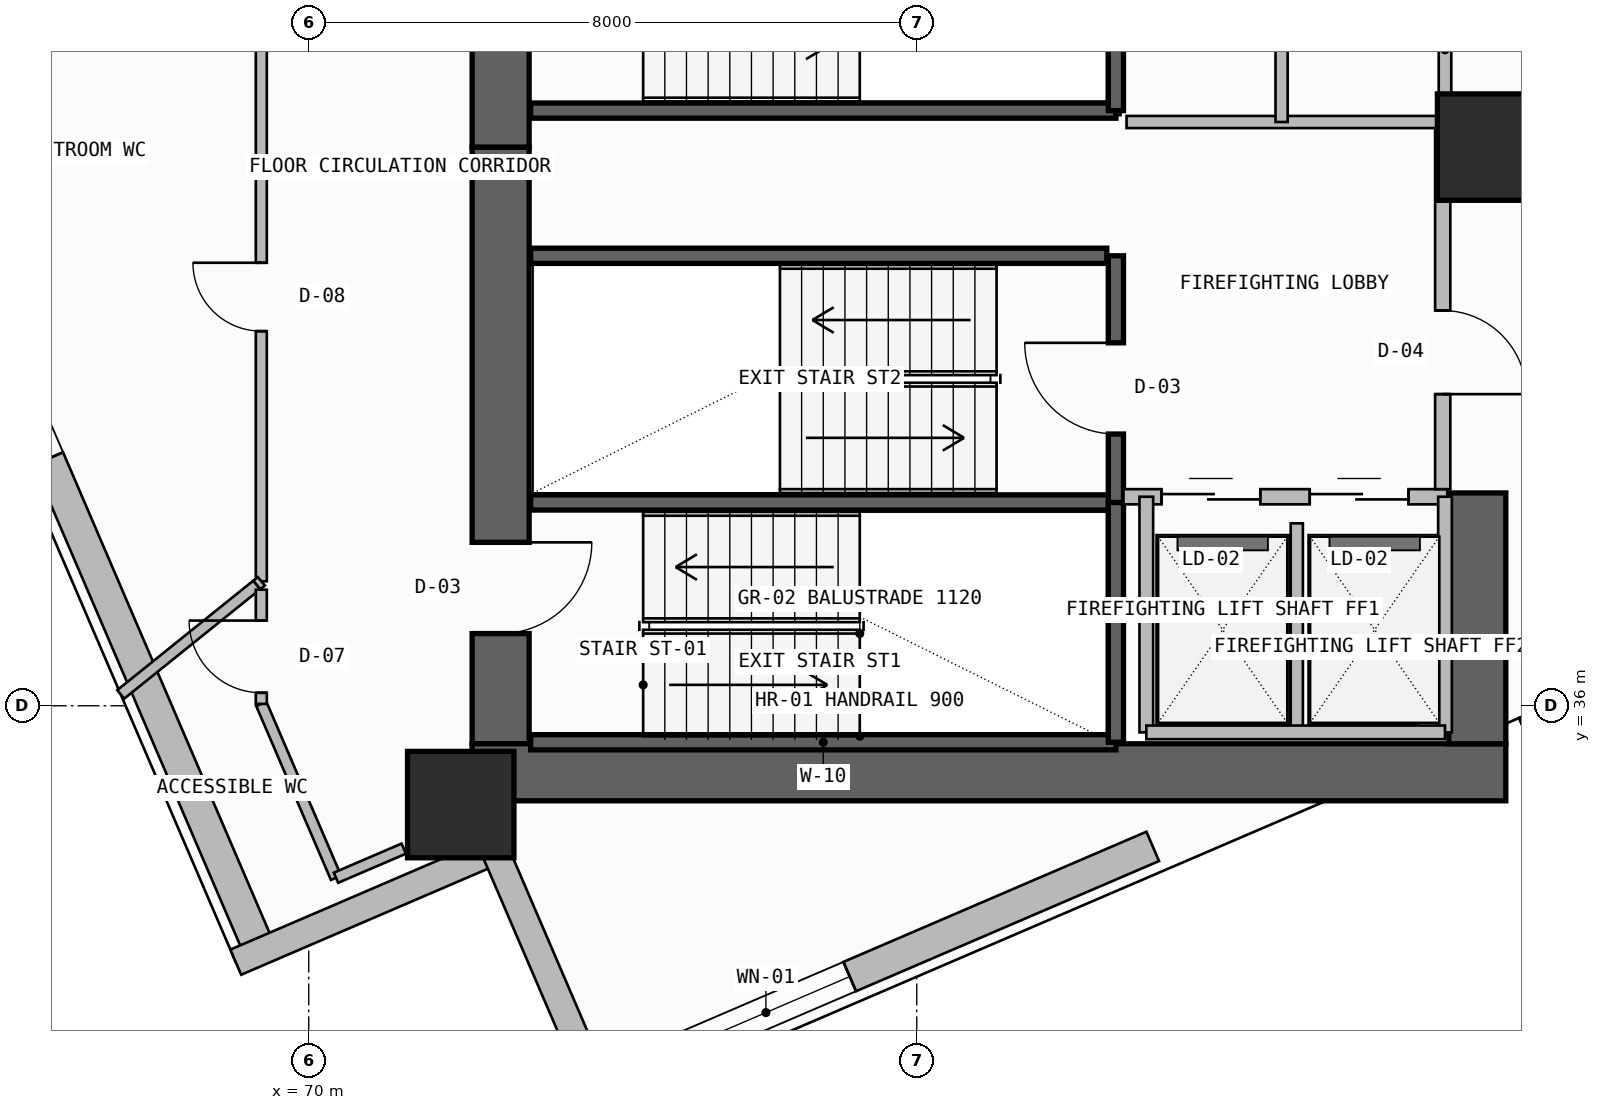
"""IFC4 building model, lengths in metres.
Left out: names, types, materials, properties, quantities, classifications, styles, units other than length and angle.
Written with IfcOpenShell. Run it as: python <this file> out.ifc"""

import sys

from ifc_helpers import new_model, si_unit, direction, frame, frame_2d, origin, origin_2d, place, context, subcontext, project, spatial, rectangle, extrude, element, fill, save


model = new_model("IFC4")
c1 = context("Model", 3, precision=1e-05, world=origin(), true_north=direction((0.0, 1.0)))
c2 = subcontext(c1, "Body", "Model", "MODEL_VIEW")
j1 = project(units=[si_unit("LENGTHUNIT", "METRE"), si_unit("PLANEANGLEUNIT", "RADIAN")], contexts=[c1])
p1 = place(None, origin())
s1 = spatial("IfcSite", under=j1, at=p1, CompositionType="ELEMENT")
p2 = place(p1, origin())
s2 = spatial("IfcBuilding", under=s1, at=p2, CompositionType="ELEMENT")
p3 = place(p2, frame((0.0, 0.0, 164.7)))
s3 = spatial("IfcBuildingStorey", under=s2, at=p3, CompositionType="ELEMENT", Elevation=164.7)
p4 = place(p3, frame((72.525, 35.5, -0.4), z_axis=(0.0, 0.0, 1.0), x_axis=(0.0, 1.0, 0.0)))
e1 = element("IfcWall", 1, at=p4, inside=s3, PredefinedType="SHEAR", context=c2, shape_type="SweptSolid", body=[
    extrude(rectangle(XDim=7.85, YDim=0.75, at=frame_2d((3.925, 0.0))), origin(), (0.0, 0.0, 1.0), 3.74),
])
p5 = place(p4, frame((1.45, 0.0, 0.4)))
e2 = element("IfcOpeningElement", 2, at=p5, cuts=e1, PredefinedType="OPENING", context=c2, shape_type="SweptSolid", body=[
    extrude(rectangle(XDim=1.2, YDim=2.2, at=frame_2d((0.6, 1.1))), frame((0.0, 0.385, 0.0), z_axis=(0.0, -1.0, 0.0), x_axis=(1.0, 0.0, 0.0)), (0.0, 0.0, 1.0), 0.77),
])
p6 = place(p3, frame((72.15, 35.125, -0.4), z_axis=(0.0, 0.0, 1.0), x_axis=(1.0, 0.0, 0.0)))
e3 = element("IfcWall", 3, at=p6, inside=s3, PredefinedType="SHEAR", context=c2, shape_type="SweptSolid", body=[
    extrude(rectangle(XDim=13.6, YDim=0.75, at=frame_2d((6.8, 0.0))), origin(), (0.0, 0.0, 1.0), 3.74),
])
p7 = place(p3, frame((85.375, 35.5, -0.4), z_axis=(0.0, 0.0, 1.0), x_axis=(0.0, 1.0, 0.0)))
e4 = element("IfcWall", 4, at=p7, inside=s3, PredefinedType="SHEAR", context=c2, shape_type="SweptSolid", body=[
    extrude(rectangle(XDim=3.3, YDim=0.75, at=frame_2d((1.65, 0.0))), origin(), (0.0, 0.0, 1.0), 3.74),
])
p8 = place(p3, frame((72.525, 43.35, -0.4), z_axis=(0.0, 0.0, 1.0), x_axis=(0.0, 1.0, 0.0)))
e5 = element("IfcWall", 5, at=p8, inside=s3, PredefinedType="SHEAR", context=c2, shape_type="SweptSolid", body=[
    extrude(rectangle(XDim=12.7, YDim=0.75, at=frame_2d((6.35, 0.0))), origin(), (0.0, 0.0, 1.0), 3.74),
])
p9 = place(p8, frame((1.35, 0.0, 0.4)))
e6 = element("IfcOpeningElement", 6, at=p9, cuts=e5, PredefinedType="OPENING", context=c2, shape_type="SweptSolid", body=[
    extrude(rectangle(XDim=1.2, YDim=2.2, at=frame_2d((0.6, 1.1))), frame((0.0, 0.385, 0.0), z_axis=(0.0, -1.0, 0.0), x_axis=(1.0, 0.0, 0.0)), (0.0, 0.0, 1.0), 0.77),
])
for number, where, z_axis, x_axis in (
    (7, (72.0, 34.7, 0.0), (0.0, 0.0, 1.0), (1.0, 0.0, 0.0)),
    (8, (85.55, 43.35, 0.0), (0.0, 0.0, 1.0), (1.0, 0.0, 0.0)),
):
    element("IfcColumn", number, at=place(p3, frame(where, z_axis=z_axis, x_axis=x_axis)), inside=s3, PredefinedType="COLUMN", context=c2, shape_type="SweptSolid", body=[
        extrude(rectangle(XDim=1.4, YDim=1.4, at=origin_2d()), origin(), (0.0, 0.0, 1.0), 3.6),
    ])
p10 = place(p3, frame((73.779, 31.003, 0.0), z_axis=(0.0, 0.0, 1.0), x_axis=(0.918797817688, 0.394728476565, 0.0)))
e9 = element("IfcWall", 9, at=p10, inside=s3, PredefinedType="SOLIDWALL", context=c2, shape_type="SweptSolid", body=[
    extrude(rectangle(XDim=7.973, YDim=0.42, at=frame_2d((3.987, 0.0))), origin(), (0.0, 0.0, 1.0), 3.34),
])
p11 = place(p10, frame((1.234, 0.0, 1.2)))
e10 = element("IfcOpeningElement", 10, at=p11, cuts=e9, PredefinedType="OPENING", context=c2, shape_type="SweptSolid", body=[
    extrude(rectangle(XDim=2.4, YDim=0.9, at=frame_2d((1.2, 0.45))), frame((0.0, 0.22, 0.0), z_axis=(0.0, -1.0, 0.0), x_axis=(1.0, 0.0, 0.0)), (0.0, 0.0, 1.0), 0.44),
])
p12 = place(p3, frame((64.367, 44.391, 0.0), z_axis=(0.0, 0.0, 1.0), x_axis=(0.394757430431, -0.918785378159, 0.0)))
e11 = element("IfcWall", 11, at=p12, inside=s3, PredefinedType="SOLIDWALL", context=c2, shape_type="SweptSolid", body=[
    extrude(rectangle(XDim=12.654, YDim=0.42, at=frame_2d((6.327, 0.0))), origin(), (0.0, 0.0, 1.0), 2.725),
])
p13 = place(p12, frame((3.193, 0.0, 1.2)))
e12 = element("IfcOpeningElement", 12, at=p13, cuts=e11, PredefinedType="OPENING", context=c2, shape_type="SweptSolid", body=[
    extrude(rectangle(XDim=2.4, YDim=0.9, at=frame_2d((1.2, 0.45))), frame((0.0, 0.22, 0.0), z_axis=(0.0, -1.0, 0.0), x_axis=(1.0, 0.0, 0.0)), (0.0, 0.0, 1.0), 0.44),
])
p14 = place(p3, frame((69.04, 32.627, 0.0), z_axis=(0.0, 0.0, 1.0), x_axis=(0.91879775808, 0.394728615312, 0.0)))
e13 = element("IfcWall", 13, at=p14, inside=s3, PredefinedType="SOLIDWALL", context=c2, shape_type="SweptSolid", body=[
    extrude(rectangle(XDim=3.713, YDim=0.36, at=frame_2d((1.856, 0.0))), origin(), (0.0, 0.0, 1.0), 3.34),
])
p15 = place(p3, frame((72.451, 34.092, 0.0), z_axis=(0.0, 0.0, 1.0), x_axis=(0.394752464447, -0.918787511786, 0.0)))
e14 = element("IfcWall", 14, at=p15, inside=s3, PredefinedType="SOLIDWALL", context=c2, shape_type="SweptSolid", body=[
    extrude(rectangle(XDim=3.713, YDim=0.36, at=frame_2d((1.856, 0.0))), origin(), (0.0, 0.0, 1.0), 3.34),
])
for number, where, z_axis, x_axis in (
    (15, (72.92, 35.52, -0.4), (0.0, 0.0, 1.0), (1.0, 0.0, 0.0)),
    (16, (72.92, 38.675, -0.4), (0.0, 0.0, 1.0), (1.0, 0.0, 0.0)),
):
    element("IfcWall", number, at=place(p3, frame(where, z_axis=z_axis, x_axis=x_axis)), inside=s3, PredefinedType="SOLIDWALL", context=c2, shape_type="SweptSolid", body=[
        extrude(rectangle(XDim=7.7, YDim=0.2, at=frame_2d((3.85, 0.0))), origin(), (0.0, 0.0, 1.0), 3.74),
    ])
p16 = place(p3, frame((80.62, 35.52, -0.4), z_axis=(0.0, 0.0, 1.0), x_axis=(0.0, 1.0, 0.0)))
e17 = element("IfcWall", 17, at=p16, inside=s3, PredefinedType="SOLIDWALL", context=c2, shape_type="SweptSolid", body=[
    extrude(rectangle(XDim=3.155, YDim=0.2, at=frame_2d((1.578, 0.0))), origin(), (0.0, 0.0, 1.0), 3.74),
])
p17 = place(p3, frame((80.62, 38.675, -0.4), z_axis=(0.0, 0.0, 1.0), x_axis=(0.0, 1.0, 0.0)))
e18 = element("IfcWall", 18, at=p17, inside=s3, PredefinedType="SOLIDWALL", context=c2, shape_type="SweptSolid", body=[
    extrude(rectangle(XDim=3.245, YDim=0.2, at=frame_2d((1.623, 0.0))), origin(), (0.0, 0.0, 1.0), 3.74),
])
p18 = place(p17, frame((0.9, 0.0, 0.4)))
e19 = element("IfcOpeningElement", 19, at=p18, cuts=e18, PredefinedType="OPENING", context=c2, shape_type="SweptSolid", body=[
    extrude(rectangle(XDim=1.2, YDim=2.2, at=frame_2d((0.6, 1.1))), frame((0.0, 0.11, 0.0), z_axis=(0.0, -1.0, 0.0), x_axis=(1.0, 0.0, 0.0)), (0.0, 0.0, 1.0), 0.22),
])
p19 = place(p3, frame((80.72, 38.75, 0.0), z_axis=(0.0, 0.0, 1.0), x_axis=(1.0, 0.0, 0.0)))
e20 = element("IfcWall", 20, at=p19, inside=s3, PredefinedType="SOLIDWALL", context=c2, shape_type="SweptSolid", body=[
    extrude(rectangle(XDim=4.26, YDim=0.2, at=frame_2d((2.13, 0.0))), origin(), (0.0, 0.0, 1.0), 3.34),
])
p20 = place(p19, frame((0.5, 0.0, 0.0)))
e21 = element("IfcOpeningElement", 21, at=p20, cuts=e20, PredefinedType="OPENING", context=c2, shape_type="SweptSolid", body=[
    extrude(rectangle(XDim=1.3, YDim=2.3, at=frame_2d((0.65, 1.15))), frame((0.0, 0.11, 0.0), z_axis=(0.0, -1.0, 0.0), x_axis=(1.0, 0.0, 0.0)), (0.0, 0.0, 1.0), 0.22),
])
p21 = place(p19, frame((2.45, 0.0, 0.0)))
e22 = element("IfcOpeningElement", 22, at=p21, cuts=e20, PredefinedType="OPENING", context=c2, shape_type="SweptSolid", body=[
    extrude(rectangle(XDim=1.3, YDim=2.3, at=frame_2d((0.65, 1.15))), frame((0.0, 0.11, 0.0), z_axis=(0.0, -1.0, 0.0), x_axis=(1.0, 0.0, 0.0)), (0.0, 0.0, 1.0), 0.22),
])
p22 = place(p3, frame((83.0, 35.65, 0.0), z_axis=(0.0, 0.0, 1.0), x_axis=(0.0, 1.0, 0.0)))
e23 = element("IfcWall", 23, at=p22, inside=s3, PredefinedType="PLUMBINGWALL", context=c2, shape_type="SweptSolid", body=[
    extrude(rectangle(XDim=2.75, YDim=0.16, at=frame_2d((1.375, 0.0))), origin(), (0.0, 0.0, 1.0), 3.34),
])
for number, where, z_axis, x_axis in (
    (24, (84.95, 35.65, 0.0), (0.0, 0.0, 1.0), (0.0, 1.0, 0.0)),
    (25, (81.02, 35.65, 0.0), (0.0, 0.0, 1.0), (0.0, 1.0, 0.0)),
):
    element("IfcWall", number, at=place(p3, frame(where, z_axis=z_axis, x_axis=x_axis)), inside=s3, PredefinedType="SOLIDWALL", context=c2, shape_type="SweptSolid", body=[
        extrude(rectangle(XDim=3.1, YDim=0.18, at=frame_2d((1.55, 0.0))), origin(), (0.0, 0.0, 1.0), 3.34),
    ])
p23 = place(p3, frame((81.02, 35.65, 0.0), z_axis=(0.0, 0.0, 1.0), x_axis=(1.0, 0.0, 0.0)))
e26 = element("IfcWall", 26, at=p23, inside=s3, PredefinedType="SOLIDWALL", context=c2, shape_type="SweptSolid", body=[
    extrude(rectangle(XDim=3.93, YDim=0.18, at=frame_2d((1.965, 0.0))), origin(), (0.0, 0.0, 1.0), 3.34),
])
p24 = place(p3, frame((84.92, 38.85, 0.0), z_axis=(0.0, 0.0, 1.0), x_axis=(0.0, 1.0, 0.0)))
e27 = element("IfcWall", 27, at=p24, inside=s3, PredefinedType="SOLIDWALL", context=c2, shape_type="SweptSolid", body=[
    extrude(rectangle(XDim=4.83, YDim=0.2, at=frame_2d((2.415, 0.0))), origin(), (0.0, 0.0, 1.0), 3.34),
])
p25 = place(p24, frame((1.25, 0.0, 0.0)))
e28 = element("IfcOpeningElement", 28, at=p25, cuts=e27, PredefinedType="OPENING", context=c2, shape_type="SweptSolid", body=[
    extrude(rectangle(XDim=1.1, YDim=2.2, at=frame_2d((0.55, 1.1))), frame((0.0, 0.11, 0.0), z_axis=(0.0, -1.0, 0.0), x_axis=(1.0, 0.0, 0.0)), (0.0, 0.0, 1.0), 0.22),
])
p26 = place(p3, frame((72.92, 41.92, -0.4), z_axis=(0.0, 0.0, 1.0), x_axis=(1.0, 0.0, 0.0)))
e29 = element("IfcWall", 29, at=p26, inside=s3, PredefinedType="SOLIDWALL", context=c2, shape_type="SweptSolid", body=[
    extrude(rectangle(XDim=7.58, YDim=0.2, at=frame_2d((3.79, 0.0))), origin(), (0.0, 0.0, 1.0), 3.74),
])
p27 = place(p3, frame((72.92, 43.83, -0.4), z_axis=(0.0, 0.0, 1.0), x_axis=(1.0, 0.0, 0.0)))
e30 = element("IfcWall", 30, at=p27, inside=s3, PredefinedType="SOLIDWALL", context=c2, shape_type="SweptSolid", body=[
    extrude(rectangle(XDim=7.7, YDim=0.2, at=frame_2d((3.85, 0.0))), origin(), (0.0, 0.0, 1.0), 3.74),
])
p28 = place(p3, frame((80.62, 43.83, -0.4), z_axis=(0.0, 0.0, 1.0), x_axis=(0.0, 1.0, 0.0)))
e31 = element("IfcWall", 31, at=p28, inside=s3, PredefinedType="SOLIDWALL", context=c2, shape_type="SweptSolid", body=[
    extrude(rectangle(XDim=3.24, YDim=0.2, at=frame_2d((1.62, 0.0))), origin(), (0.0, 0.0, 1.0), 3.74),
])
p29 = place(p3, frame((84.95, 43.68, 0.0), z_axis=(0.0, 0.0, 1.0), x_axis=(0.0, 1.0, 0.0)))
e32 = element("IfcWall", 32, at=p29, inside=s3, PredefinedType="PLUMBINGWALL", context=c2, shape_type="SweptSolid", body=[
    extrude(rectangle(XDim=1.9, YDim=0.165, at=frame_2d((0.95, 0.0))), origin(), (0.0, 0.0, 1.0), 3.34),
])
p30 = place(p3, frame((80.76, 43.68, 0.0), z_axis=(0.0, 0.0, 1.0), x_axis=(1.0, 0.0, 0.0)))
e33 = element("IfcWall", 33, at=p30, inside=s3, PredefinedType="PLUMBINGWALL", context=c2, shape_type="SweptSolid", body=[
    extrude(rectangle(XDim=4.19, YDim=0.16, at=frame_2d((2.095, 0.0))), origin(), (0.0, 0.0, 1.0), 3.34),
])
p31 = place(p3, frame((82.8, 43.68, 0.0), z_axis=(0.0, 0.0, 1.0), x_axis=(0.0, 1.0, 0.0)))
e34 = element("IfcWall", 34, at=p31, inside=s3, PredefinedType="PLUMBINGWALL", context=c2, shape_type="SweptSolid", body=[
    extrude(rectangle(XDim=1.9, YDim=0.16, at=frame_2d((0.95, 0.0))), origin(), (0.0, 0.0, 1.0), 3.34),
])
p32 = place(p3, frame((69.376, 45.119, 0.0), z_axis=(0.0, 0.0, 1.0), x_axis=(0.0, -1.0, 0.0)))
e35 = element("IfcWall", 35, at=p32, inside=s3, PredefinedType="PARTITIONING", context=c2, shape_type="SweptSolid", body=[
    extrude(rectangle(XDim=7.481, YDim=0.145, at=frame_2d((3.74, 0.0))), origin(), (0.0, 0.0, 1.0), 3.34),
])
p33 = place(p32, frame((3.29, 0.0, 0.0)))
e36 = element("IfcOpeningElement", 36, at=p33, cuts=e35, PredefinedType="OPENING", context=c2, shape_type="SweptSolid", body=[
    extrude(rectangle(XDim=0.9, YDim=2.1, at=frame_2d((0.45, 1.05))), frame((0.0, 0.083, 0.0), z_axis=(0.0, -1.0, 0.0), x_axis=(1.0, 0.0, 0.0)), (0.0, 0.0, 1.0), 0.165),
])
p34 = place(p3, frame((69.376, 37.638, 0.0), z_axis=(0.0, 0.0, 1.0), x_axis=(-0.763621722134, -0.645663895138, 0.0)))
e37 = element("IfcWall", 37, at=p34, inside=s3, PredefinedType="PARTITIONING", context=c2, shape_type="SweptSolid", body=[
    extrude(rectangle(XDim=0.079, YDim=0.145, at=frame_2d((0.039, 0.0))), origin(), (0.0, 0.0, 1.0), 3.34),
])
p35 = place(p3, frame((69.315, 37.589, 0.0), z_axis=(0.0, 0.0, 1.0), x_axis=(-0.779153593162, -0.626833054539, 0.0)))
e38 = element("IfcWall", 38, at=p35, inside=s3, PredefinedType="PARTITIONING", context=c2, shape_type="SweptSolid", body=[
    extrude(rectangle(XDim=2.295, YDim=0.145, at=frame_2d((1.147, 0.0))), origin(), (0.0, 0.0, 1.0), 3.34),
])
p36 = place(p3, frame((69.376, 36.024, 0.0), z_axis=(0.0, 0.0, 1.0), x_axis=(0.394712324254, -0.91880475678, 0.0)))
e39 = element("IfcWall", 39, at=p36, inside=s3, PredefinedType="PARTITIONING", context=c2, shape_type="SweptSolid", body=[
    extrude(rectangle(XDim=2.489, YDim=0.145, at=frame_2d((1.245, 0.0))), origin(), (0.0, 0.0, 1.0), 3.34),
])
p37 = place(p3, frame((69.376, 37.527, 0.0), z_axis=(0.0, 0.0, 1.0), x_axis=(0.0, -1.0, 0.0)))
e40 = element("IfcWall", 40, at=p37, inside=s3, PredefinedType="PARTITIONING", context=c2, shape_type="SweptSolid", body=[
    extrude(rectangle(XDim=1.503, YDim=0.145, at=frame_2d((0.751, 0.0))), origin(), (0.0, 0.0, 1.0), 3.34),
])
p38 = place(p37, frame((0.406, 0.0, 0.0)))
e41 = element("IfcOpeningElement", 41, at=p38, cuts=e40, PredefinedType="OPENING", context=c2, shape_type="SweptSolid", body=[
    extrude(rectangle(XDim=0.95, YDim=2.15, at=frame_2d((0.475, 1.075))), frame((0.0, 0.083, 0.0), z_axis=(0.0, -1.0, 0.0), x_axis=(1.0, 0.0, 0.0)), (0.0, 0.0, 1.0), 0.165),
])
p39 = place(p3, frame((70.359, 33.738, 0.0), z_axis=(0.0, 0.0, 1.0), x_axis=(0.918845364602, 0.394617784633, 0.0)))
e42 = element("IfcWall", 42, at=p39, inside=s3, PredefinedType="PARTITIONING", context=c2, shape_type="SweptSolid", body=[
    extrude(rectangle(XDim=0.97, YDim=0.145, at=frame_2d((0.485, 0.0))), origin(), (0.0, 0.0, 1.0), 3.34),
])
p40 = place(p11, origin())
e43 = element("IfcWindow", 43, at=p40, inside=s3, PartitioningType="SINGLE_PANEL", PredefinedType="WINDOW", context=c2, shape_type="SweptSolid", body=[
    extrude(rectangle(XDim=2.4, YDim=0.9, at=frame_2d((1.2, 0.45))), frame((0.0, 0.03, 0.0), z_axis=(0.0, -1.0, 0.0), x_axis=(1.0, 0.0, 0.0)), (0.0, 0.0, 1.0), 0.06),
])
fill(e10, e43)
p41 = place(p5, frame((1.2, 0.0, 0.0), z_axis=(0.0, 0.0, 1.0), x_axis=(-1.0, 0.0, 0.0)))
e44 = element("IfcDoor", 44, at=p41, inside=s3, OperationType="SINGLE_SWING_LEFT", PredefinedType="USERDEFINED", context=c2, shape_type="SweptSolid", body=[
    extrude(rectangle(XDim=1.2, YDim=2.2, at=frame_2d((0.6, 1.1))), frame((0.0, 0.025, 0.0), z_axis=(0.0, -1.0, 0.0), x_axis=(1.0, 0.0, 0.0)), (0.0, 0.0, 1.0), 0.05),
])
fill(e2, e44)
p42 = place(p18, origin())
e45 = element("IfcDoor", 45, at=p42, inside=s3, OperationType="SINGLE_SWING_RIGHT", PredefinedType="USERDEFINED", context=c2, shape_type="SweptSolid", body=[
    extrude(rectangle(XDim=1.2, YDim=2.2, at=frame_2d((0.6, 1.1))), frame((0.0, 0.025, 0.0), z_axis=(0.0, -1.0, 0.0), x_axis=(1.0, 0.0, 0.0)), (0.0, 0.0, 1.0), 0.05),
])
fill(e19, e45)
p43 = place(p20, origin())
e46 = element("IfcDoor", 46, at=p43, inside=s3, OperationType="DOUBLE_DOOR_SLIDING", PredefinedType="DOOR", context=c2, shape_type="SweptSolid", body=[
    extrude(rectangle(XDim=1.3, YDim=2.3, at=frame_2d((0.65, 1.15))), frame((0.0, 0.025, 0.0), z_axis=(0.0, -1.0, 0.0), x_axis=(1.0, 0.0, 0.0)), (0.0, 0.0, 1.0), 0.05),
])
fill(e21, e46)
p44 = place(p21, origin())
e47 = element("IfcDoor", 47, at=p44, inside=s3, OperationType="DOUBLE_DOOR_SLIDING", PredefinedType="DOOR", context=c2, shape_type="SweptSolid", body=[
    extrude(rectangle(XDim=1.3, YDim=2.3, at=frame_2d((0.65, 1.15))), frame((0.0, 0.025, 0.0), z_axis=(0.0, -1.0, 0.0), x_axis=(1.0, 0.0, 0.0)), (0.0, 0.0, 1.0), 0.05),
])
fill(e22, e47)
p45 = place(p25, frame((1.1, 0.0, 0.0), z_axis=(0.0, 0.0, 1.0), x_axis=(-1.0, 0.0, 0.0)))
e48 = element("IfcDoor", 48, at=p45, inside=s3, OperationType="SINGLE_SWING_RIGHT", PredefinedType="DOOR", context=c2, shape_type="SweptSolid", body=[
    extrude(rectangle(XDim=1.1, YDim=2.2, at=frame_2d((0.55, 1.1))), frame((0.0, 0.025, 0.0), z_axis=(0.0, -1.0, 0.0), x_axis=(1.0, 0.0, 0.0)), (0.0, 0.0, 1.0), 0.05),
])
fill(e28, e48)
p46 = place(p33, frame((0.9, 0.0, 0.0), z_axis=(0.0, 0.0, 1.0), x_axis=(-1.0, 0.0, 0.0)))
e49 = element("IfcDoor", 49, at=p46, inside=s3, OperationType="SINGLE_SWING_RIGHT", PredefinedType="DOOR", context=c2, shape_type="SweptSolid", body=[
    extrude(rectangle(XDim=0.9, YDim=2.1, at=frame_2d((0.45, 1.05))), frame((0.0, 0.025, 0.0), z_axis=(0.0, -1.0, 0.0), x_axis=(1.0, 0.0, 0.0)), (0.0, 0.0, 1.0), 0.05),
])
fill(e36, e49)
p47 = place(p38, frame((0.95, 0.0, 0.0), z_axis=(0.0, 0.0, 1.0), x_axis=(-1.0, 0.0, 0.0)))
e50 = element("IfcDoor", 50, at=p47, inside=s3, OperationType="SINGLE_SWING_RIGHT", PredefinedType="DOOR", context=c2, shape_type="SweptSolid", body=[
    extrude(rectangle(XDim=0.95, YDim=2.15, at=frame_2d((0.475, 1.075))), frame((0.0, 0.025, 0.0), z_axis=(0.0, -1.0, 0.0), x_axis=(1.0, 0.0, 0.0)), (0.0, 0.0, 1.0), 0.05),
])
fill(e41, e50)
save(model, sys.argv[1])
